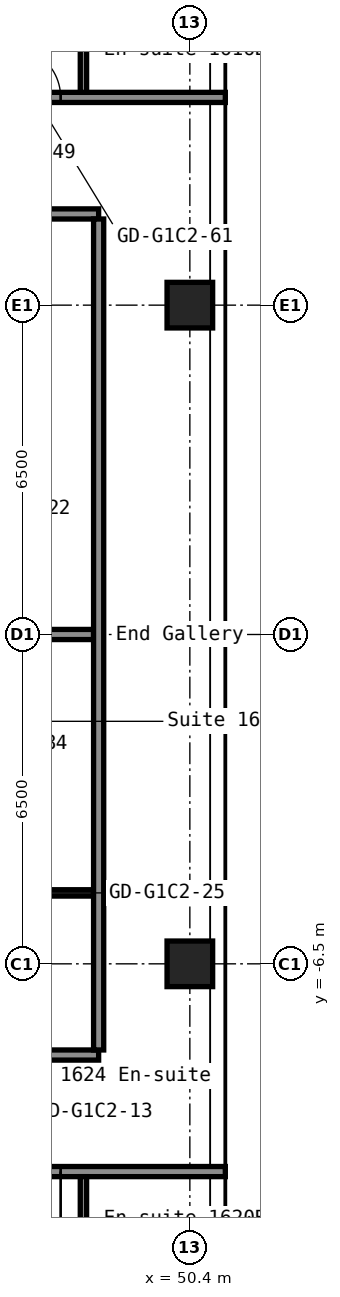
"""IFC4 building model, lengths in metres.
Left out: names, types, materials, properties, quantities, classifications, styles, units other than length and angle.
Written with IfcOpenShell. Run it as: python <this file> out.ifc"""

import sys

from ifc_helpers import new_model, si_unit, direction, frame, frame_2d, origin, origin_2d, place, context, subcontext, project, spatial, rectangle, hollow_rectangle, extrude, element, fill, save


model = new_model("IFC4")
c1 = context("Model", 3, precision=1e-05, world=origin(), true_north=direction((0.0, 1.0)))
c2 = subcontext(c1, "Body", "Model", "MODEL_VIEW")
j1 = project(units=[si_unit("LENGTHUNIT", "METRE"), si_unit("PLANEANGLEUNIT", "RADIAN")], contexts=[c1])
p1 = place(None, origin())
s1 = spatial("IfcSite", under=j1, at=p1, CompositionType="ELEMENT")
p2 = place(p1, origin())
s2 = spatial("IfcBuilding", under=s1, at=p2, CompositionType="ELEMENT")
p3 = place(p2, frame((0.0, 0.0, 58.2)))
s3 = spatial("IfcBuildingStorey", under=s2, at=p3, CompositionType="ELEMENT", Elevation=58.2)
for number, where, z_axis, x_axis in (
    (1, (50.4, -6.5, 0.0), (0.0, 0.0, 1.0), (1.0, 0.0, 0.0)),
    (2, (50.4, 6.5, 0.0), (0.0, 0.0, 1.0), (1.0, 0.0, 0.0)),
):
    element("IfcColumn", number, at=place(p3, frame(where, z_axis=z_axis, x_axis=x_axis)), inside=s3, PredefinedType="COLUMN", context=c2, shape_type="SweptSolid", body=[
        extrude(hollow_rectangle(XDim=0.9, YDim=0.9, WallThickness=0.036, at=origin_2d()), origin(), (0.0, 0.0, 1.0), 2.8),
    ])
p4 = place(p3, frame((16.8, -10.6, 0.0), z_axis=(0.0, 0.0, 1.0), x_axis=(1.0, 0.0, 0.0)))
e3 = element("IfcWall", 3, at=p4, inside=s3, PredefinedType="PARTITIONING", context=c2, shape_type="SweptSolid", body=[
    extrude(rectangle(XDim=34.3, YDim=0.2, at=frame_2d((17.15, 0.0))), origin(), (0.0, 0.0, 1.0), 2.8),
])
p5 = place(p4, frame((2.0, 0.0, 0.0)))
e4 = element("IfcOpeningElement", 4, at=p5, cuts=e3, PredefinedType="OPENING", context=c2, shape_type="SweptSolid", body=[
    extrude(rectangle(XDim=1.0, YDim=2.1, at=frame_2d((0.5, 1.05))), frame((0.0, 0.11, 0.0), z_axis=(0.0, -1.0, 0.0), x_axis=(1.0, 0.0, 0.0)), (0.0, 0.0, 1.0), 0.22),
])
p6 = place(p4, frame((11.25, 0.0, 0.0)))
e5 = element("IfcOpeningElement", 5, at=p6, cuts=e3, PredefinedType="OPENING", context=c2, shape_type="SweptSolid", body=[
    extrude(rectangle(XDim=1.0, YDim=2.1, at=frame_2d((0.5, 1.05))), frame((0.0, 0.11, 0.0), z_axis=(0.0, -1.0, 0.0), x_axis=(1.0, 0.0, 0.0)), (0.0, 0.0, 1.0), 0.22),
])
p7 = place(p4, frame((12.95, 0.0, 0.0)))
e6 = element("IfcOpeningElement", 6, at=p7, cuts=e3, PredefinedType="OPENING", context=c2, shape_type="SweptSolid", body=[
    extrude(rectangle(XDim=1.0, YDim=2.1, at=frame_2d((0.5, 1.05))), frame((0.0, 0.11, 0.0), z_axis=(0.0, -1.0, 0.0), x_axis=(1.0, 0.0, 0.0)), (0.0, 0.0, 1.0), 0.22),
])
p8 = place(p4, frame((22.3, 0.0, 0.0)))
e7 = element("IfcOpeningElement", 7, at=p8, cuts=e3, PredefinedType="OPENING", context=c2, shape_type="SweptSolid", body=[
    extrude(rectangle(XDim=1.0, YDim=2.1, at=frame_2d((0.5, 1.05))), frame((0.0, 0.11, 0.0), z_axis=(0.0, -1.0, 0.0), x_axis=(1.0, 0.0, 0.0)), (0.0, 0.0, 1.0), 0.22),
])
p9 = place(p4, frame((28.15, 0.0, 0.0)))
e8 = element("IfcOpeningElement", 8, at=p9, cuts=e3, PredefinedType="OPENING", context=c2, shape_type="SweptSolid", body=[
    extrude(rectangle(XDim=1.0, YDim=2.1, at=frame_2d((0.5, 1.05))), frame((0.0, 0.11, 0.0), z_axis=(0.0, -1.0, 0.0), x_axis=(1.0, 0.0, 0.0)), (0.0, 0.0, 1.0), 0.22),
])
p10 = place(p4, frame((30.05, 0.0, 0.0)))
e9 = element("IfcOpeningElement", 9, at=p10, cuts=e3, PredefinedType="OPENING", context=c2, shape_type="SweptSolid", body=[
    extrude(rectangle(XDim=1.0, YDim=2.1, at=frame_2d((0.5, 1.05))), frame((0.0, 0.11, 0.0), z_axis=(0.0, -1.0, 0.0), x_axis=(1.0, 0.0, 0.0)), (0.0, 0.0, 1.0), 0.22),
])
p11 = place(p3, frame((33.6, -8.3, 0.0), z_axis=(0.0, 0.0, 1.0), x_axis=(1.0, 0.0, 0.0)))
e10 = element("IfcWall", 10, at=p11, inside=s3, PredefinedType="PARTITIONING", context=c2, shape_type="SweptSolid", body=[
    extrude(rectangle(XDim=15.0, YDim=0.2, at=frame_2d((7.5, 0.0))), origin(), (0.0, 0.0, 1.0), 2.8),
])
p12 = place(p11, frame((2.0, 0.0, 0.0)))
e11 = element("IfcOpeningElement", 11, at=p12, cuts=e10, PredefinedType="OPENING", context=c2, shape_type="SweptSolid", body=[
    extrude(rectangle(XDim=1.0, YDim=2.1, at=frame_2d((0.5, 1.05))), frame((0.0, 0.11, 0.0), z_axis=(0.0, -1.0, 0.0), x_axis=(1.0, 0.0, 0.0)), (0.0, 0.0, 1.0), 0.22),
])
p13 = place(p11, frame((9.55, 0.0, 0.0)))
e12 = element("IfcOpeningElement", 12, at=p13, cuts=e10, PredefinedType="OPENING", context=c2, shape_type="SweptSolid", body=[
    extrude(rectangle(XDim=1.0, YDim=2.1, at=frame_2d((0.5, 1.05))), frame((0.0, 0.11, 0.0), z_axis=(0.0, -1.0, 0.0), x_axis=(1.0, 0.0, 0.0)), (0.0, 0.0, 1.0), 0.22),
])
p14 = place(p3, frame((45.663, -5.1, 0.0), z_axis=(0.0, 0.0, 1.0), x_axis=(1.0, 0.0, 0.0)))
e13 = element("IfcWall", 13, at=p14, inside=s3, PredefinedType="PARTITIONING", context=c2, shape_type="SweptSolid", body=[
    extrude(rectangle(XDim=2.837, YDim=0.125, at=frame_2d((1.419, 0.0))), origin(), (0.0, 0.0, 1.0), 2.8),
])
p15 = place(p14, frame((1.038, 0.0, 0.0)))
e14 = element("IfcOpeningElement", 14, at=p15, cuts=e13, PredefinedType="OPENING", context=c2, shape_type="SweptSolid", body=[
    extrude(rectangle(XDim=0.8, YDim=2.1, at=frame_2d((0.4, 1.05))), frame((0.0, 0.073, 0.0), z_axis=(0.0, -1.0, 0.0), x_axis=(1.0, 0.0, 0.0)), (0.0, 0.0, 1.0), 0.145),
])
p16 = place(p3, frame((33.6, 0.0, 0.0), z_axis=(0.0, 0.0, 1.0), x_axis=(1.0, 0.0, 0.0)))
e15 = element("IfcWall", 15, at=p16, inside=s3, PredefinedType="PARTITIONING", context=c2, shape_type="SweptSolid", body=[
    extrude(rectangle(XDim=14.9, YDim=0.2, at=frame_2d((7.45, 0.0))), origin(), (0.0, 0.0, 1.0), 2.8),
])
p17 = place(p3, frame((33.6, 8.3, 0.0), z_axis=(0.0, 0.0, 1.0), x_axis=(1.0, 0.0, 0.0)))
e16 = element("IfcWall", 16, at=p17, inside=s3, PredefinedType="PARTITIONING", context=c2, shape_type="SweptSolid", body=[
    extrude(rectangle(XDim=15.0, YDim=0.2, at=frame_2d((7.5, 0.0))), origin(), (0.0, 0.0, 1.0), 2.8),
])
p18 = place(p17, frame((2.0, 0.0, 0.0)))
e17 = element("IfcOpeningElement", 17, at=p18, cuts=e16, PredefinedType="OPENING", context=c2, shape_type="SweptSolid", body=[
    extrude(rectangle(XDim=1.0, YDim=2.1, at=frame_2d((0.5, 1.05))), frame((0.0, 0.11, 0.0), z_axis=(0.0, -1.0, 0.0), x_axis=(1.0, 0.0, 0.0)), (0.0, 0.0, 1.0), 0.22),
])
p19 = place(p17, frame((12.9, 0.0, 0.0)))
e18 = element("IfcOpeningElement", 18, at=p19, cuts=e16, PredefinedType="OPENING", context=c2, shape_type="SweptSolid", body=[
    extrude(rectangle(XDim=1.0, YDim=2.1, at=frame_2d((0.5, 1.05))), frame((0.0, 0.11, 0.0), z_axis=(0.0, -1.0, 0.0), x_axis=(1.0, 0.0, 0.0)), (0.0, 0.0, 1.0), 0.22),
])
p20 = place(p3, frame((16.8, 10.6, 0.0), z_axis=(0.0, 0.0, 1.0), x_axis=(1.0, 0.0, 0.0)))
e19 = element("IfcWall", 19, at=p20, inside=s3, PredefinedType="PARTITIONING", context=c2, shape_type="SweptSolid", body=[
    extrude(rectangle(XDim=34.3, YDim=0.2, at=frame_2d((17.15, 0.0))), origin(), (0.0, 0.0, 1.0), 2.8),
])
p21 = place(p20, frame((2.0, 0.0, 0.0)))
e20 = element("IfcOpeningElement", 20, at=p21, cuts=e19, PredefinedType="OPENING", context=c2, shape_type="SweptSolid", body=[
    extrude(rectangle(XDim=1.0, YDim=2.1, at=frame_2d((0.5, 1.05))), frame((0.0, 0.11, 0.0), z_axis=(0.0, -1.0, 0.0), x_axis=(1.0, 0.0, 0.0)), (0.0, 0.0, 1.0), 0.22),
])
p22 = place(p20, frame((11.25, 0.0, 0.0)))
e21 = element("IfcOpeningElement", 21, at=p22, cuts=e19, PredefinedType="OPENING", context=c2, shape_type="SweptSolid", body=[
    extrude(rectangle(XDim=1.0, YDim=2.1, at=frame_2d((0.5, 1.05))), frame((0.0, 0.11, 0.0), z_axis=(0.0, -1.0, 0.0), x_axis=(1.0, 0.0, 0.0)), (0.0, 0.0, 1.0), 0.22),
])
p23 = place(p20, frame((12.95, 0.0, 0.0)))
e22 = element("IfcOpeningElement", 22, at=p23, cuts=e19, PredefinedType="OPENING", context=c2, shape_type="SweptSolid", body=[
    extrude(rectangle(XDim=1.0, YDim=2.1, at=frame_2d((0.5, 1.05))), frame((0.0, 0.11, 0.0), z_axis=(0.0, -1.0, 0.0), x_axis=(1.0, 0.0, 0.0)), (0.0, 0.0, 1.0), 0.22),
])
p24 = place(p20, frame((18.8, 0.0, 0.0)))
e23 = element("IfcOpeningElement", 23, at=p24, cuts=e19, PredefinedType="OPENING", context=c2, shape_type="SweptSolid", body=[
    extrude(rectangle(XDim=1.0, YDim=2.1, at=frame_2d((0.5, 1.05))), frame((0.0, 0.11, 0.0), z_axis=(0.0, -1.0, 0.0), x_axis=(1.0, 0.0, 0.0)), (0.0, 0.0, 1.0), 0.22),
])
p25 = place(p20, frame((28.15, 0.0, 0.0)))
e24 = element("IfcOpeningElement", 24, at=p25, cuts=e19, PredefinedType="OPENING", context=c2, shape_type="SweptSolid", body=[
    extrude(rectangle(XDim=1.0, YDim=2.1, at=frame_2d((0.5, 1.05))), frame((0.0, 0.11, 0.0), z_axis=(0.0, -1.0, 0.0), x_axis=(1.0, 0.0, 0.0)), (0.0, 0.0, 1.0), 0.22),
])
p26 = place(p20, frame((30.05, 0.0, 0.0)))
e25 = element("IfcOpeningElement", 25, at=p26, cuts=e19, PredefinedType="OPENING", context=c2, shape_type="SweptSolid", body=[
    extrude(rectangle(XDim=1.0, YDim=2.1, at=frame_2d((0.5, 1.05))), frame((0.0, 0.11, 0.0), z_axis=(0.0, -1.0, 0.0), x_axis=(1.0, 0.0, 0.0)), (0.0, 0.0, 1.0), 0.22),
])
p27 = place(p3, frame((48.3, -13.6, 0.0), z_axis=(0.0, 0.0, 1.0), x_axis=(0.0, 1.0, 0.0)))
e26 = element("IfcWall", 26, at=p27, inside=s3, PredefinedType="PARTITIONING", context=c2, shape_type="SweptSolid", body=[
    extrude(rectangle(XDim=2.9, YDim=0.125, at=frame_2d((1.45, 0.0))), origin(), (0.0, 0.0, 1.0), 2.8),
])
p28 = place(p27, frame((0.6, 0.0, 0.0)))
e27 = element("IfcOpeningElement", 27, at=p28, cuts=e26, PredefinedType="OPENING", context=c2, shape_type="SweptSolid", body=[
    extrude(rectangle(XDim=0.8, YDim=2.1, at=frame_2d((0.4, 1.05))), frame((0.0, 0.073, 0.0), z_axis=(0.0, -1.0, 0.0), x_axis=(1.0, 0.0, 0.0)), (0.0, 0.0, 1.0), 0.145),
])
p29 = place(p3, frame((48.3, 10.7, 0.0), z_axis=(0.0, 0.0, 1.0), x_axis=(0.0, 1.0, 0.0)))
e28 = element("IfcWall", 28, at=p29, inside=s3, PredefinedType="PARTITIONING", context=c2, shape_type="SweptSolid", body=[
    extrude(rectangle(XDim=2.9, YDim=0.125, at=frame_2d((1.45, 0.0))), origin(), (0.0, 0.0, 1.0), 2.8),
])
p30 = place(p29, frame((1.5, 0.0, 0.0)))
e29 = element("IfcOpeningElement", 29, at=p30, cuts=e28, PredefinedType="OPENING", context=c2, shape_type="SweptSolid", body=[
    extrude(rectangle(XDim=0.8, YDim=2.1, at=frame_2d((0.4, 1.05))), frame((0.0, 0.073, 0.0), z_axis=(0.0, -1.0, 0.0), x_axis=(1.0, 0.0, 0.0)), (0.0, 0.0, 1.0), 0.145),
])
p31 = place(p3, frame((48.6, -8.2, 0.0), z_axis=(0.0, 0.0, 1.0), x_axis=(0.0, 1.0, 0.0)))
e30 = element("IfcWall", 30, at=p31, inside=s3, PredefinedType="PARTITIONING", context=c2, shape_type="SweptSolid", body=[
    extrude(rectangle(XDim=16.4, YDim=0.2, at=frame_2d((8.2, 0.0))), origin(), (0.0, 0.0, 1.0), 2.8),
])
p32 = place(p10, origin())
e31 = element("IfcDoor", 31, at=p32, inside=s3, OperationType="SINGLE_SWING_RIGHT", PredefinedType="DOOR", context=c2, shape_type="SweptSolid", body=[
    extrude(rectangle(XDim=1.0, YDim=2.1, at=frame_2d((0.5, 1.05))), frame((0.0, 0.025, 0.0), z_axis=(0.0, -1.0, 0.0), x_axis=(1.0, 0.0, 0.0)), (0.0, 0.0, 1.0), 0.05),
])
fill(e9, e31)
p33 = place(p26, origin())
e32 = element("IfcDoor", 32, at=p33, inside=s3, OperationType="SINGLE_SWING_RIGHT", PredefinedType="DOOR", context=c2, shape_type="SweptSolid", body=[
    extrude(rectangle(XDim=1.0, YDim=2.1, at=frame_2d((0.5, 1.05))), frame((0.0, 0.025, 0.0), z_axis=(0.0, -1.0, 0.0), x_axis=(1.0, 0.0, 0.0)), (0.0, 0.0, 1.0), 0.05),
])
fill(e25, e32)
save(model, sys.argv[1])
